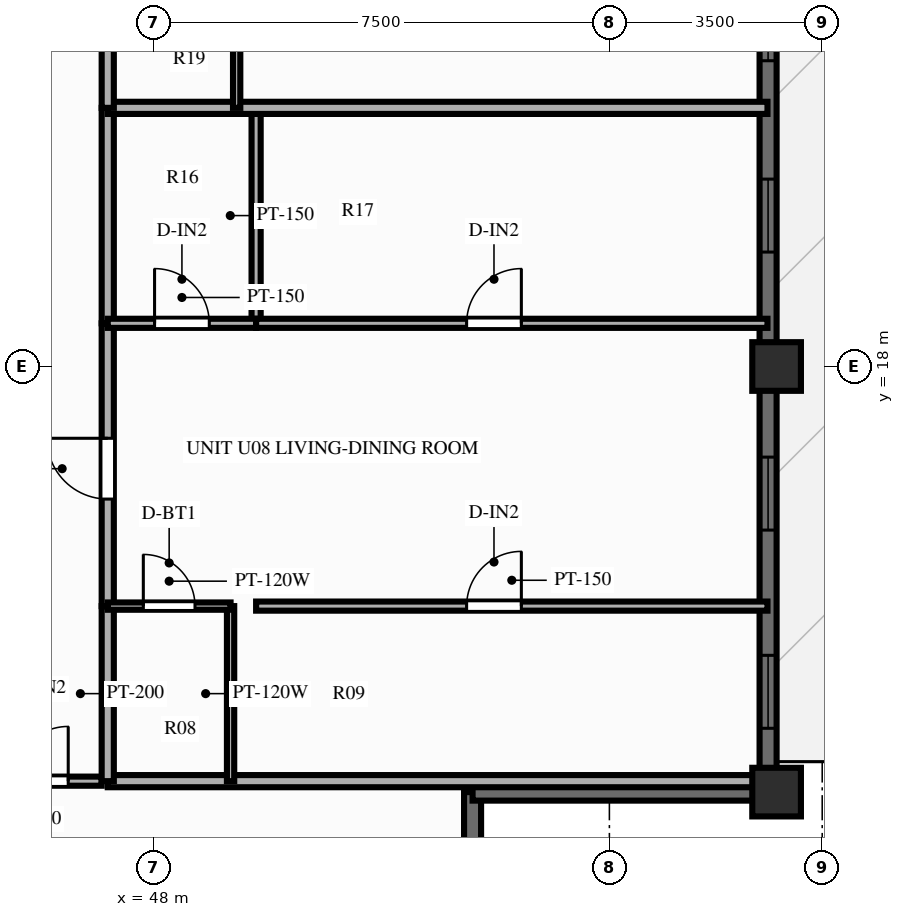
"""IFC4 building model, lengths in metres.
Left out: names, types, materials, properties, quantities, classifications, styles, units other than length and angle.
Written with IfcOpenShell. Run it as: python <this file> out.ifc"""

import sys

from ifc_helpers import new_model, si_unit, direction, frame, frame_2d, origin, origin_2d, place, context, subcontext, project, spatial, rectangle, extrude, source, transform, mapped, element, fill, save


model = new_model("IFC4")
c1 = context("Model", 3, precision=1e-05, world=origin(), true_north=direction((0.0, 1.0)))
c2 = subcontext(c1, "Body", "Model", "MODEL_VIEW")
j1 = project(units=[si_unit("LENGTHUNIT", "METRE"), si_unit("PLANEANGLEUNIT", "RADIAN")], contexts=[c1])
p1 = place(None, origin())
s1 = spatial("IfcSite", under=j1, at=p1, CompositionType="ELEMENT")
p2 = place(p1, origin())
s2 = spatial("IfcBuilding", under=s1, at=p2, CompositionType="ELEMENT")
p3 = place(p2, frame((0.0, 0.0, 179.8)))
s3 = spatial("IfcBuildingStorey", under=s2, at=p3, CompositionType="ELEMENT", Elevation=179.8)
m1 = source(origin(), c2, "Body", "SweptSolid", [
    extrude(rectangle(XDim=0.8, YDim=0.8, at=origin_2d()), origin(), (0.0, 0.0, 1.0), 3.0),
])
for number, where, z_axis, x_axis in (
    (1, (58.25, 11.0, 0.0), (0.0, 0.0, 1.0), (1.0, 0.0, 0.0)),
    (2, (58.25, 18.0, 0.0), (0.0, 0.0, 1.0), (1.0, 0.0, 0.0)),
):
    element("IfcColumn", number, at=place(p3, frame(where, z_axis=z_axis, x_axis=x_axis)), inside=s3, PredefinedType="COLUMN", context=c2, shape_type="MappedRepresentation", body=[
        mapped(m1, transform((0.0, 0.0, 0.0), scale=1.0)),
    ])
p4 = place(p3, frame((58.11, 11.0, 0.0), z_axis=(0.0, 0.0, 1.0), x_axis=(0.0, 1.0, 0.0)))
e3 = element("IfcWall", 3, at=p4, inside=s3, PredefinedType="SOLIDWALL", context=c2, shape_type="SweptSolid", body=[
    extrude(rectangle(XDim=32.0, YDim=0.28, at=frame_2d((16.0, 0.0))), origin(), (0.0, 0.0, 1.0), 2.28),
])
p5 = place(p4, frame((1.05, 0.0, 0.25)))
e4 = element("IfcOpeningElement", 4, at=p5, cuts=e3, PredefinedType="OPENING", context=c2, shape_type="SweptSolid", body=[
    extrude(rectangle(XDim=1.2, YDim=1.5, at=frame_2d((0.6, 0.75))), frame((0.0, 0.152, 0.0), z_axis=(0.0, -1.0, 0.0), x_axis=(1.0, 0.0, 0.0)), (0.0, 0.0, 1.0), 0.304),
])
p6 = place(p4, frame((4.31, 0.0, 0.25)))
e5 = element("IfcOpeningElement", 5, at=p6, cuts=e3, PredefinedType="OPENING", context=c2, shape_type="SweptSolid", body=[
    extrude(rectangle(XDim=1.2, YDim=1.5, at=frame_2d((0.6, 0.75))), frame((0.0, 0.152, 0.0), z_axis=(0.0, -1.0, 0.0), x_axis=(1.0, 0.0, 0.0)), (0.0, 0.0, 1.0), 0.304),
])
p7 = place(p4, frame((8.882, 0.0, 0.25)))
e6 = element("IfcOpeningElement", 6, at=p7, cuts=e3, PredefinedType="OPENING", context=c2, shape_type="SweptSolid", body=[
    extrude(rectangle(XDim=1.2, YDim=1.5, at=frame_2d((0.6, 0.75))), frame((0.0, 0.152, 0.0), z_axis=(0.0, -1.0, 0.0), x_axis=(1.0, 0.0, 0.0)), (0.0, 0.0, 1.0), 0.304),
])
p8 = place(p4, frame((12.029, 0.0, 0.25)))
e7 = element("IfcOpeningElement", 7, at=p8, cuts=e3, PredefinedType="OPENING", context=c2, shape_type="SweptSolid", body=[
    extrude(rectangle(XDim=1.2, YDim=1.5, at=frame_2d((0.6, 0.75))), frame((0.0, 0.152, 0.0), z_axis=(0.0, -1.0, 0.0), x_axis=(1.0, 0.0, 0.0)), (0.0, 0.0, 1.0), 0.304),
])
p9 = place(p4, frame((16.718, 0.0, 0.0), z_axis=(0.0, 0.0, 1.0), x_axis=(-1.0, 0.0, 0.0)))
e8 = element("IfcOpeningElement", 8, at=p9, cuts=e3, PredefinedType="OPENING", context=c2, shape_type="SweptSolid", body=[
    extrude(rectangle(XDim=1.6, YDim=2.15, at=frame_2d((0.8, 1.075))), frame((0.0, 0.152, 0.0), z_axis=(0.0, -1.0, 0.0), x_axis=(1.0, 0.0, 0.0)), (0.0, 0.0, 1.0), 0.304),
])
p10 = place(p4, frame((19.163, 0.0, 0.25)))
e9 = element("IfcOpeningElement", 9, at=p10, cuts=e3, PredefinedType="OPENING", context=c2, shape_type="SweptSolid", body=[
    extrude(rectangle(XDim=1.2, YDim=1.5, at=frame_2d((0.6, 0.75))), frame((0.0, 0.152, 0.0), z_axis=(0.0, -1.0, 0.0), x_axis=(1.0, 0.0, 0.0)), (0.0, 0.0, 1.0), 0.304),
])
p11 = place(p4, frame((22.47, 0.0, 0.25)))
e10 = element("IfcOpeningElement", 10, at=p11, cuts=e3, PredefinedType="OPENING", context=c2, shape_type="SweptSolid", body=[
    extrude(rectangle(XDim=1.2, YDim=1.5, at=frame_2d((0.6, 0.75))), frame((0.0, 0.152, 0.0), z_axis=(0.0, -1.0, 0.0), x_axis=(1.0, 0.0, 0.0)), (0.0, 0.0, 1.0), 0.304),
])
p12 = place(p4, frame((26.006, 0.0, 0.25)))
e11 = element("IfcOpeningElement", 11, at=p12, cuts=e3, PredefinedType="OPENING", context=c2, shape_type="SweptSolid", body=[
    extrude(rectangle(XDim=1.2, YDim=1.5, at=frame_2d((0.6, 0.75))), frame((0.0, 0.152, 0.0), z_axis=(0.0, -1.0, 0.0), x_axis=(1.0, 0.0, 0.0)), (0.0, 0.0, 1.0), 0.304),
])
p13 = place(p4, frame((29.266, 0.0, 0.25)))
e12 = element("IfcOpeningElement", 12, at=p13, cuts=e3, PredefinedType="OPENING", context=c2, shape_type="SweptSolid", body=[
    extrude(rectangle(XDim=1.2, YDim=1.5, at=frame_2d((0.6, 0.75))), frame((0.0, 0.152, 0.0), z_axis=(0.0, -1.0, 0.0), x_axis=(1.0, 0.0, 0.0)), (0.0, 0.0, 1.0), 0.304),
])
for number, where, z_axis, x_axis in (
    (13, (53.25, 6.08, 0.0), (0.0, 0.0, 1.0), (0.0, 1.0, 0.0)),
    (14, (53.25, 11.0, 0.0), (0.0, 0.0, 1.0), (1.0, 0.0, 0.0)),
):
    element("IfcWall", number, at=place(p3, frame(where, z_axis=z_axis, x_axis=x_axis)), inside=s3, PredefinedType="SOLIDWALL", context=c2, shape_type="SweptSolid", body=[
        extrude(rectangle(XDim=4.92, YDim=0.28, at=frame_2d((2.46, 0.0))), origin(), (0.0, 0.0, 1.0), 2.28),
    ])
p14 = place(p3, frame((44.82, 11.18, 0.0), z_axis=(0.0, 0.0, 1.0), x_axis=(1.0, 0.0, 0.0)))
e15 = element("IfcWall", 15, at=p14, inside=s3, PredefinedType="PARTITIONING", context=c2, shape_type="SweptSolid", body=[
    extrude(rectangle(XDim=2.33, YDim=0.15, at=frame_2d((1.165, 0.0))), origin(), (0.0, 0.0, 1.0), 2.79),
])
p15 = place(p14, frame((0.88, 0.0, 0.0)))
e16 = element("IfcOpeningElement", 16, at=p15, cuts=e15, PredefinedType="OPENING", context=c2, shape_type="SweptSolid", body=[
    extrude(rectangle(XDim=0.9, YDim=2.1, at=frame_2d((0.45, 1.05))), frame((0.0, 0.087, 0.0), z_axis=(0.0, -1.0, 0.0), x_axis=(1.0, 0.0, 0.0)), (0.0, 0.0, 1.0), 0.174),
])
p16 = place(p3, frame((47.25, 11.18, 0.0), z_axis=(0.0, 0.0, 1.0), x_axis=(1.0, 0.0, 0.0)))
e17 = element("IfcWall", 17, at=p16, inside=s3, PredefinedType="PARTITIONING", context=c2, shape_type="SweptSolid", body=[
    extrude(rectangle(XDim=10.85, YDim=0.2, at=frame_2d((5.425, 0.0))), origin(), (0.0, 0.0, 1.0), 2.79),
])
p17 = place(p3, frame((47.25, 11.18, 0.0), z_axis=(0.0, 0.0, 1.0), x_axis=(0.0, 1.0, 0.0)))
e18 = element("IfcWall", 18, at=p17, inside=s3, PredefinedType="PARTITIONING", context=c2, shape_type="SweptSolid", body=[
    extrude(rectangle(XDim=2.879, YDim=0.2, at=frame_2d((1.439, 0.0))), origin(), (0.0, 0.0, 1.0), 2.79),
])
p18 = place(p3, frame((47.25, 14.059, 0.0), z_axis=(0.0, 0.0, 1.0), x_axis=(0.0, 1.0, 0.0)))
e19 = element("IfcWall", 19, at=p18, inside=s3, PredefinedType="PARTITIONING", context=c2, shape_type="SweptSolid", body=[
    extrude(rectangle(XDim=4.651, YDim=0.2, at=frame_2d((2.326, 0.0))), origin(), (0.0, 0.0, 1.0), 2.79),
])
p19 = place(p18, frame((1.76, 0.0, 0.0)))
e20 = element("IfcOpeningElement", 20, at=p19, cuts=e19, PredefinedType="OPENING", context=c2, shape_type="SweptSolid", body=[
    extrude(rectangle(XDim=1.0, YDim=2.15, at=frame_2d((0.5, 1.075))), frame((0.0, 0.112, 0.0), z_axis=(0.0, -1.0, 0.0), x_axis=(1.0, 0.0, 0.0)), (0.0, 0.0, 1.0), 0.224),
])
p20 = place(p3, frame((47.25, 18.71, 0.0), z_axis=(0.0, 0.0, 1.0), x_axis=(0.0, 1.0, 0.0)))
e21 = element("IfcWall", 21, at=p20, inside=s3, PredefinedType="PARTITIONING", context=c2, shape_type="SweptSolid", body=[
    extrude(rectangle(XDim=3.544, YDim=0.2, at=frame_2d((1.772, 0.0))), origin(), (0.0, 0.0, 1.0), 2.79),
])
p21 = place(p3, frame((49.27, 11.18, 0.0), z_axis=(0.0, 0.0, 1.0), x_axis=(0.0, 1.0, 0.0)))
e22 = element("IfcWall", 22, at=p21, inside=s3, PredefinedType="PARTITIONING", context=c2, shape_type="SweptSolid", body=[
    extrude(rectangle(XDim=2.879, YDim=0.12, at=frame_2d((1.439, 0.0))), origin(), (0.0, 0.0, 1.0), 2.79),
])
p22 = place(p3, frame((49.69, 18.71, 0.0), z_axis=(0.0, 0.0, 1.0), x_axis=(0.0, 1.0, 0.0)))
e23 = element("IfcWall", 23, at=p22, inside=s3, PredefinedType="PARTITIONING", context=c2, shape_type="SweptSolid", body=[
    extrude(rectangle(XDim=3.544, YDim=0.15, at=frame_2d((1.772, 0.0))), origin(), (0.0, 0.0, 1.0), 2.79),
])
p23 = place(p3, frame((47.25, 14.059, 0.0), z_axis=(0.0, 0.0, 1.0), x_axis=(1.0, 0.0, 0.0)))
e24 = element("IfcWall", 24, at=p23, inside=s3, PredefinedType="PARTITIONING", context=c2, shape_type="SweptSolid", body=[
    extrude(rectangle(XDim=2.02, YDim=0.12, at=frame_2d((1.01, 0.0))), origin(), (0.0, 0.0, 1.0), 2.79),
])
p24 = place(p23, frame((0.585, 0.0, 0.0)))
e25 = element("IfcOpeningElement", 25, at=p24, cuts=e24, PredefinedType="OPENING", context=c2, shape_type="SweptSolid", body=[
    extrude(rectangle(XDim=0.85, YDim=2.05, at=frame_2d((0.425, 1.025))), frame((0.0, 0.072, 0.0), z_axis=(0.0, -1.0, 0.0), x_axis=(1.0, 0.0, 0.0)), (0.0, 0.0, 1.0), 0.144),
])
p25 = place(p3, frame((49.69, 14.059, 0.0), z_axis=(0.0, 0.0, 1.0), x_axis=(1.0, 0.0, 0.0)))
e26 = element("IfcWall", 26, at=p25, inside=s3, PredefinedType="PARTITIONING", context=c2, shape_type="SweptSolid", body=[
    extrude(rectangle(XDim=8.41, YDim=0.15, at=frame_2d((4.205, 0.0))), origin(), (0.0, 0.0, 1.0), 2.79),
])
p26 = place(p25, frame((3.462, 0.0, 0.0)))
e27 = element("IfcOpeningElement", 27, at=p26, cuts=e26, PredefinedType="OPENING", context=c2, shape_type="SweptSolid", body=[
    extrude(rectangle(XDim=0.9, YDim=2.1, at=frame_2d((0.45, 1.05))), frame((0.0, 0.087, 0.0), z_axis=(0.0, -1.0, 0.0), x_axis=(1.0, 0.0, 0.0)), (0.0, 0.0, 1.0), 0.174),
])
p27 = place(p3, frame((47.25, 18.71, 0.0), z_axis=(0.0, 0.0, 1.0), x_axis=(1.0, 0.0, 0.0)))
e28 = element("IfcWall", 28, at=p27, inside=s3, PredefinedType="PARTITIONING", context=c2, shape_type="SweptSolid", body=[
    extrude(rectangle(XDim=2.44, YDim=0.15, at=frame_2d((1.22, 0.0))), origin(), (0.0, 0.0, 1.0), 2.79),
])
p28 = place(p27, frame((0.77, 0.0, 0.0)))
e29 = element("IfcOpeningElement", 29, at=p28, cuts=e28, PredefinedType="OPENING", context=c2, shape_type="SweptSolid", body=[
    extrude(rectangle(XDim=0.9, YDim=2.1, at=frame_2d((0.45, 1.05))), frame((0.0, 0.087, 0.0), z_axis=(0.0, -1.0, 0.0), x_axis=(1.0, 0.0, 0.0)), (0.0, 0.0, 1.0), 0.174),
])
p29 = place(p3, frame((49.69, 18.71, 0.0), z_axis=(0.0, 0.0, 1.0), x_axis=(1.0, 0.0, 0.0)))
e30 = element("IfcWall", 30, at=p29, inside=s3, PredefinedType="PARTITIONING", context=c2, shape_type="SweptSolid", body=[
    extrude(rectangle(XDim=8.41, YDim=0.15, at=frame_2d((4.205, 0.0))), origin(), (0.0, 0.0, 1.0), 2.79),
])
p30 = place(p29, frame((3.462, 0.0, 0.0)))
e31 = element("IfcOpeningElement", 31, at=p30, cuts=e30, PredefinedType="OPENING", context=c2, shape_type="SweptSolid", body=[
    extrude(rectangle(XDim=0.9, YDim=2.1, at=frame_2d((0.45, 1.05))), frame((0.0, 0.087, 0.0), z_axis=(0.0, -1.0, 0.0), x_axis=(1.0, 0.0, 0.0)), (0.0, 0.0, 1.0), 0.174),
])
p31 = place(p3, frame((47.25, 22.254, 0.0), z_axis=(0.0, 0.0, 1.0), x_axis=(1.0, 0.0, 0.0)))
e32 = element("IfcWall", 32, at=p31, inside=s3, PredefinedType="PARTITIONING", context=c2, shape_type="SweptSolid", body=[
    extrude(rectangle(XDim=10.85, YDim=0.2, at=frame_2d((5.425, 0.0))), origin(), (0.0, 0.0, 1.0), 2.39),
])
p32 = place(p3, frame((47.25, 22.254, 0.0), z_axis=(0.0, 0.0, 1.0), x_axis=(0.0, 1.0, 0.0)))
e33 = element("IfcWall", 33, at=p32, inside=s3, PredefinedType="PARTITIONING", context=c2, shape_type="SweptSolid", body=[
    extrude(rectangle(XDim=2.75, YDim=0.2, at=frame_2d((1.375, 0.0))), origin(), (0.0, 0.0, 1.0), 2.79),
])
p33 = place(p3, frame((49.37, 22.254, 0.0), z_axis=(0.0, 0.0, 1.0), x_axis=(0.0, 1.0, 0.0)))
e34 = element("IfcWall", 34, at=p33, inside=s3, PredefinedType="PARTITIONING", context=c2, shape_type="SweptSolid", body=[
    extrude(rectangle(XDim=2.75, YDim=0.12, at=frame_2d((1.375, 0.0))), origin(), (0.0, 0.0, 1.0), 2.79),
])
m2 = source(origin(), c2, "Body", "SweptSolid", [
    extrude(rectangle(XDim=1.2, YDim=1.5, at=frame_2d((0.6, 0.75))), frame((0.0, 0.03, 0.0), z_axis=(0.0, -1.0, 0.0), x_axis=(1.0, 0.0, 0.0)), (0.0, 0.0, 1.0), 0.06),
])
p34 = place(p5, origin())
e35 = element("IfcWindow", 35, at=p34, inside=s3, PartitioningType="SINGLE_PANEL", PredefinedType="WINDOW", context=c2, shape_type="MappedRepresentation", body=[
    mapped(m2, transform((0.0, 0.0, 0.0), scale=1.0)),
])
fill(e4, e35)
p35 = place(p6, origin())
e36 = element("IfcWindow", 36, at=p35, inside=s3, PartitioningType="SINGLE_PANEL", PredefinedType="WINDOW", context=c2, shape_type="MappedRepresentation", body=[
    mapped(m2, transform((0.0, 0.0, 0.0), scale=1.0)),
])
fill(e5, e36)
p36 = place(p7, origin())
e37 = element("IfcWindow", 37, at=p36, inside=s3, PartitioningType="SINGLE_PANEL", PredefinedType="WINDOW", context=c2, shape_type="MappedRepresentation", body=[
    mapped(m2, transform((0.0, 0.0, 0.0), scale=1.0)),
])
fill(e6, e37)
p37 = place(p8, origin())
e38 = element("IfcWindow", 38, at=p37, inside=s3, PartitioningType="SINGLE_PANEL", PredefinedType="WINDOW", context=c2, shape_type="MappedRepresentation", body=[
    mapped(m2, transform((0.0, 0.0, 0.0), scale=1.0)),
])
fill(e7, e38)
m3 = source(origin(), c2, "Body", "SweptSolid", [
    extrude(rectangle(XDim=0.9, YDim=2.1, at=frame_2d((0.45, 1.05))), frame((0.0, 0.025, 0.0), z_axis=(0.0, -1.0, 0.0), x_axis=(1.0, 0.0, 0.0)), (0.0, 0.0, 1.0), 0.05),
])
p38 = place(p15, origin())
e39 = element("IfcDoor", 39, at=p38, inside=s3, OperationType="SINGLE_SWING_RIGHT", PredefinedType="DOOR", context=c2, shape_type="MappedRepresentation", body=[
    mapped(m3, transform((0.0, 0.0, 0.0), scale=1.0)),
])
fill(e16, e39)
m4 = source(origin(), c2, "Body", "SweptSolid", [
    extrude(rectangle(XDim=1.0, YDim=2.15, at=frame_2d((0.5, 1.075))), frame((0.0, 0.025, 0.0), z_axis=(0.0, -1.0, 0.0), x_axis=(1.0, 0.0, 0.0)), (0.0, 0.0, 1.0), 0.05),
])
p39 = place(p19, origin())
e40 = element("IfcDoor", 40, at=p39, inside=s3, OperationType="SINGLE_SWING_RIGHT", PredefinedType="DOOR", context=c2, shape_type="MappedRepresentation", body=[
    mapped(m4, transform((0.0, 0.0, 0.0), scale=1.0)),
])
fill(e20, e40)
m5 = source(origin(), c2, "Body", "SweptSolid", [
    extrude(rectangle(XDim=0.85, YDim=2.05, at=frame_2d((0.425, 1.025))), frame((0.0, 0.025, 0.0), z_axis=(0.0, -1.0, 0.0), x_axis=(1.0, 0.0, 0.0)), (0.0, 0.0, 1.0), 0.05),
])
p40 = place(p24, origin())
e41 = element("IfcDoor", 41, at=p40, inside=s3, OperationType="SINGLE_SWING_LEFT", PredefinedType="DOOR", context=c2, shape_type="MappedRepresentation", body=[
    mapped(m5, transform((0.0, 0.0, 0.0), scale=1.0)),
])
fill(e25, e41)
p41 = place(p26, origin())
e42 = element("IfcDoor", 42, at=p41, inside=s3, OperationType="SINGLE_SWING_RIGHT", PredefinedType="DOOR", context=c2, shape_type="MappedRepresentation", body=[
    mapped(m3, transform((0.0, 0.0, 0.0), scale=1.0)),
])
fill(e27, e42)
p42 = place(p28, origin())
e43 = element("IfcDoor", 43, at=p42, inside=s3, OperationType="SINGLE_SWING_LEFT", PredefinedType="DOOR", context=c2, shape_type="MappedRepresentation", body=[
    mapped(m3, transform((0.0, 0.0, 0.0), scale=1.0)),
])
fill(e29, e43)
p43 = place(p30, origin())
e44 = element("IfcDoor", 44, at=p43, inside=s3, OperationType="SINGLE_SWING_RIGHT", PredefinedType="DOOR", context=c2, shape_type="MappedRepresentation", body=[
    mapped(m3, transform((0.0, 0.0, 0.0), scale=1.0)),
])
fill(e31, e44)
save(model, sys.argv[1])
